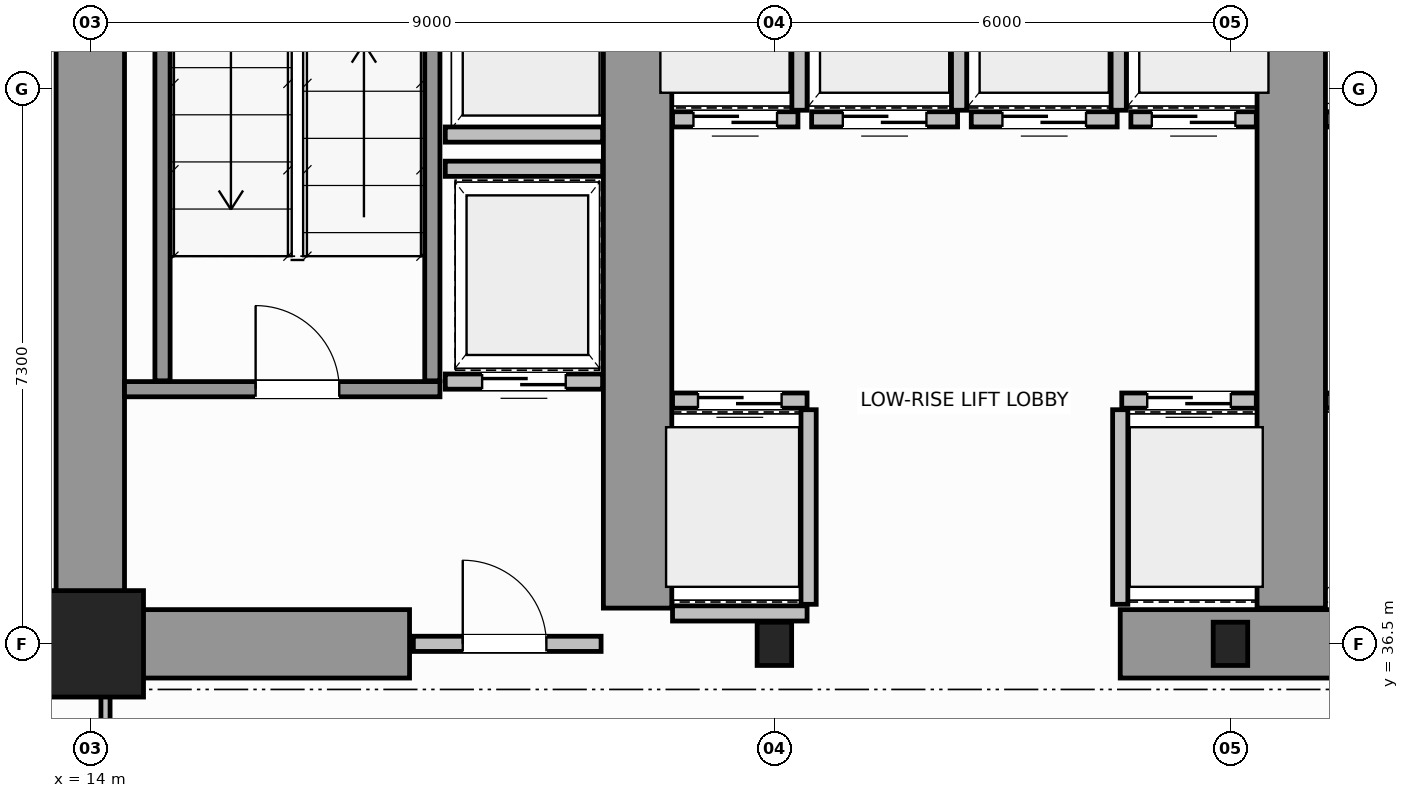
"""IFC4 building model, lengths in metres.
Left out: names, types, materials, properties, quantities, classifications, styles, units other than length and angle.
Written with IfcOpenShell. Run it as: python <this file> out.ifc"""

import sys

from ifc_helpers import new_model, si_unit, direction, frame, frame_2d, origin, origin_2d, place, context, subcontext, project, spatial, rectangle, i_section, extrude, source, transform, mapped, element, fill, save


model = new_model("IFC4")
c1 = context("Model", 3, precision=1e-05, world=origin(), true_north=direction((0.0, 1.0)))
c2 = subcontext(c1, "Body", "Model", "MODEL_VIEW")
j1 = project(units=[si_unit("LENGTHUNIT", "METRE"), si_unit("PLANEANGLEUNIT", "RADIAN")], contexts=[c1])
p1 = place(None, origin())
s1 = spatial("IfcSite", under=j1, at=p1, CompositionType="ELEMENT")
p2 = place(p1, origin())
s2 = spatial("IfcBuilding", under=s1, at=p2, CompositionType="ELEMENT")
p3 = place(p2, frame((0.0, 0.0, 64.4)))
s3 = spatial("IfcBuildingStorey", under=s2, at=p3, CompositionType="ELEMENT", Elevation=64.4)
m1 = source(origin(), c2, "Body", "SweptSolid", [
    extrude(rectangle(XDim=1.4, YDim=1.4, at=origin_2d()), origin(), (0.0, 0.0, 1.0), 3.8),
])
p4 = place(p3, frame((14.0, 36.5, 0.0), z_axis=(0.0, 0.0, 1.0), x_axis=(1.0, 0.0, 0.0)))
e1 = element("IfcColumn", 1, at=p4, inside=s3, PredefinedType="COLUMN", context=c2, shape_type="MappedRepresentation", body=[
    mapped(m1, transform((0.0, 0.0, 0.0), scale=1.0)),
])
m2 = source(origin(), c2, "Body", "SweptSolid", [
    extrude(i_section(OverallWidth=0.454, OverallDepth=0.569, WebThickness=0.078, FlangeThickness=0.08, FilletRadius=0.015, at=origin_2d()), origin(), (0.0, 0.0, 1.0), 3.8),
])
for number, where, z_axis, x_axis in (
    (2, (23.0, 36.5, 0.0), (0.0, 0.0, 1.0), (1.0, 0.0, 0.0)),
    (3, (29.0, 36.5, 0.0), (0.0, 0.0, 1.0), (1.0, 0.0, 0.0)),
):
    element("IfcColumn", number, at=place(p3, frame(where, z_axis=z_axis, x_axis=x_axis)), inside=s3, PredefinedType="COLUMN", context=c2, shape_type="MappedRepresentation", body=[
        mapped(m2, transform((0.0, 0.0, 0.0), scale=1.0)),
    ])
p5 = place(p3, frame((14.0, 36.5, 0.0), z_axis=(0.0, 0.0, 1.0), x_axis=(0.0, 1.0, 0.0)))
e4 = element("IfcWall", 4, at=p5, inside=s3, PredefinedType="SHEAR", context=c2, shape_type="SweptSolid", body=[
    extrude(rectangle(XDim=14.5, YDim=0.9, at=frame_2d((7.25, 0.0))), origin(), (0.0, 0.0, 1.0), 3.8),
])
p6 = place(p3, frame((14.47, 36.5, 0.0), z_axis=(0.0, 0.0, 1.0), x_axis=(1.0, 0.0, 0.0)))
e5 = element("IfcWall", 5, at=p6, inside=s3, PredefinedType="SHEAR", context=c2, shape_type="SweptSolid", body=[
    extrude(rectangle(XDim=3.73, YDim=0.9, at=frame_2d((1.865, 0.0))), origin(), (0.0, 0.0, 1.0), 2.38),
])
p7 = place(p3, frame((27.55, 36.5, 0.0), z_axis=(0.0, 0.0, 1.0), x_axis=(1.0, 0.0, 0.0)))
e6 = element("IfcWall", 6, at=p7, inside=s3, PredefinedType="SHEAR", context=c2, shape_type="SweptSolid", body=[
    extrude(rectangle(XDim=4.5, YDim=0.9, at=frame_2d((2.25, 0.0))), origin(), (0.0, 0.0, 1.0), 3.8),
])
for number, where, z_axis, x_axis in (
    (7, (21.2, 36.97, 0.0), (0.0, 0.0, 1.0), (0.0, 1.0, 0.0)),
    (8, (29.8, 36.97, 0.0), (0.0, 0.0, 1.0), (0.0, 1.0, 0.0)),
):
    element("IfcWall", number, at=place(p3, frame(where, z_axis=z_axis, x_axis=x_axis)), inside=s3, PredefinedType="SHEAR", context=c2, shape_type="SweptSolid", body=[
        extrude(rectangle(XDim=9.23, YDim=0.9, at=frame_2d((4.615, 0.0))), origin(), (0.0, 0.0, 1.0), 3.8),
    ])
p8 = place(p3, frame((14.45, 39.85, 0.0), z_axis=(0.0, 0.0, 1.0), x_axis=(1.0, 0.0, 0.0)))
e9 = element("IfcWall", 9, at=p8, inside=s3, PredefinedType="SOLIDWALL", context=c2, shape_type="SweptSolid", body=[
    extrude(rectangle(XDim=4.15, YDim=0.2, at=frame_2d((2.075, 0.0))), origin(), (0.0, 0.0, 1.0), 3.8),
])
p9 = place(p8, frame((1.725, 0.0, 0.0)))
e10 = element("IfcOpeningElement", 10, at=p9, cuts=e9, PredefinedType="OPENING", context=c2, shape_type="SweptSolid", body=[
    extrude(rectangle(XDim=1.1, YDim=2.15, at=frame_2d((0.55, 1.075))), frame((0.0, 0.11, 0.0), z_axis=(0.0, -1.0, 0.0), x_axis=(1.0, 0.0, 0.0)), (0.0, 0.0, 1.0), 0.22),
])
for number, where, z_axis, x_axis in (
    (11, (14.95, 39.96, 0.0), (0.0, 0.0, 1.0), (0.0, 1.0, 0.0)),
    (12, (18.5, 39.96, 0.0), (0.0, 0.0, 1.0), (0.0, 1.0, 0.0)),
):
    element("IfcWall", number, at=place(p3, frame(where, z_axis=z_axis, x_axis=x_axis)), inside=s3, PredefinedType="SOLIDWALL", context=c2, shape_type="SweptSolid", body=[
        extrude(rectangle(XDim=9.93, YDim=0.2, at=frame_2d((4.965, 0.0))), origin(), (0.0, 0.0, 1.0), 3.8),
    ])
p10 = place(p3, frame((18.25, 36.5, 0.0), z_axis=(0.0, 0.0, 1.0), x_axis=(1.0, 0.0, 0.0)))
e13 = element("IfcWall", 13, at=p10, inside=s3, PredefinedType="SOLIDWALL", context=c2, shape_type="SweptSolid", body=[
    extrude(rectangle(XDim=2.47, YDim=0.2, at=frame_2d((1.235, 0.0))), origin(), (0.0, 0.0, 1.0), 2.37),
])
p11 = place(p10, frame((0.65, 0.0, 0.0)))
e14 = element("IfcOpeningElement", 14, at=p11, cuts=e13, PredefinedType="OPENING", context=c2, shape_type="SweptSolid", body=[
    extrude(rectangle(XDim=1.1, YDim=2.15, at=frame_2d((0.55, 1.075))), frame((0.0, 0.11, 0.0), z_axis=(0.0, -1.0, 0.0), x_axis=(1.0, 0.0, 0.0)), (0.0, 0.0, 1.0), 0.22),
])
p12 = place(p3, frame((21.66, 39.7, 0.0), z_axis=(0.0, 0.0, 1.0), x_axis=(1.0, 0.0, 0.0)))
e15 = element("IfcWall", 15, at=p12, inside=s3, PredefinedType="SOLIDWALL", context=c2, shape_type="SweptSolid", body=[
    extrude(rectangle(XDim=1.77, YDim=0.2, at=frame_2d((0.885, 0.0))), origin(), (0.0, 0.0, 1.0), 3.58),
])
p13 = place(p12, frame((0.335, 0.0, 0.0)))
e16 = element("IfcOpeningElement", 16, at=p13, cuts=e15, PredefinedType="OPENING", context=c2, shape_type="SweptSolid", body=[
    extrude(rectangle(XDim=1.1, YDim=2.15, at=frame_2d((0.55, 1.075))), frame((0.0, 0.11, 0.0), z_axis=(0.0, -1.0, 0.0), x_axis=(1.0, 0.0, 0.0)), (0.0, 0.0, 1.0), 0.22),
])
p14 = place(p3, frame((21.66, 36.9, 0.0), z_axis=(0.0, 0.0, 1.0), x_axis=(1.0, 0.0, 0.0)))
e17 = element("IfcWall", 17, at=p14, inside=s3, PredefinedType="SOLIDWALL", context=c2, shape_type="SweptSolid", body=[
    extrude(rectangle(XDim=1.77, YDim=0.2, at=frame_2d((0.885, 0.0))), origin(), (0.0, 0.0, 1.0), 2.37),
])
p15 = place(p3, frame((23.45, 37.02, 0.0), z_axis=(0.0, 0.0, 1.0), x_axis=(0.0, 1.0, 0.0)))
e18 = element("IfcWall", 18, at=p15, inside=s3, PredefinedType="SOLIDWALL", context=c2, shape_type="SweptSolid", body=[
    extrude(rectangle(XDim=2.56, YDim=0.2, at=frame_2d((1.28, 0.0))), origin(), (0.0, 0.0, 1.0), 3.58),
])
p16 = place(p3, frame((27.57, 39.7, 0.0), z_axis=(0.0, 0.0, 1.0), x_axis=(1.0, 0.0, 0.0)))
e19 = element("IfcWall", 19, at=p16, inside=s3, PredefinedType="SOLIDWALL", context=c2, shape_type="SweptSolid", body=[
    extrude(rectangle(XDim=1.77, YDim=0.2, at=frame_2d((0.885, 0.0))), origin(), (0.0, 0.0, 1.0), 3.58),
])
p17 = place(p16, frame((0.335, 0.0, 0.0)))
e20 = element("IfcOpeningElement", 20, at=p17, cuts=e19, PredefinedType="OPENING", context=c2, shape_type="SweptSolid", body=[
    extrude(rectangle(XDim=1.1, YDim=2.15, at=frame_2d((0.55, 1.075))), frame((0.0, 0.11, 0.0), z_axis=(0.0, -1.0, 0.0), x_axis=(1.0, 0.0, 0.0)), (0.0, 0.0, 1.0), 0.22),
])
p18 = place(p3, frame((27.55, 37.02, 0.0), z_axis=(0.0, 0.0, 1.0), x_axis=(0.0, 1.0, 0.0)))
e21 = element("IfcWall", 21, at=p18, inside=s3, PredefinedType="SOLIDWALL", context=c2, shape_type="SweptSolid", body=[
    extrude(rectangle(XDim=2.56, YDim=0.2, at=frame_2d((1.28, 0.0))), origin(), (0.0, 0.0, 1.0), 3.58),
])
p19 = place(p3, frame((21.66, 43.4, 0.0), z_axis=(0.0, 0.0, 1.0), x_axis=(1.0, 0.0, 0.0)))
e22 = element("IfcWall", 22, at=p19, inside=s3, PredefinedType="SOLIDWALL", context=c2, shape_type="SweptSolid", body=[
    extrude(rectangle(XDim=1.65, YDim=0.2, at=frame_2d((0.825, 0.0))), origin(), (0.0, 0.0, 1.0), 3.58),
])
p20 = place(p19, frame((0.275, 0.0, 0.0)))
e23 = element("IfcOpeningElement", 23, at=p20, cuts=e22, PredefinedType="OPENING", context=c2, shape_type="SweptSolid", body=[
    extrude(rectangle(XDim=1.1, YDim=2.15, at=frame_2d((0.55, 1.075))), frame((0.0, 0.11, 0.0), z_axis=(0.0, -1.0, 0.0), x_axis=(1.0, 0.0, 0.0)), (0.0, 0.0, 1.0), 0.22),
])
p21 = place(p3, frame((23.33, 43.52, 0.0), z_axis=(0.0, 0.0, 1.0), x_axis=(0.0, 1.0, 0.0)))
e24 = element("IfcWall", 24, at=p21, inside=s3, PredefinedType="SOLIDWALL", context=c2, shape_type="SweptSolid", body=[
    extrude(rectangle(XDim=2.56, YDim=0.2, at=frame_2d((1.28, 0.0))), origin(), (0.0, 0.0, 1.0), 3.58),
])
p22 = place(p3, frame((23.49, 43.4, 0.0), z_axis=(0.0, 0.0, 1.0), x_axis=(1.0, 0.0, 0.0)))
e25 = element("IfcWall", 25, at=p22, inside=s3, PredefinedType="SOLIDWALL", context=c2, shape_type="SweptSolid", body=[
    extrude(rectangle(XDim=1.92, YDim=0.2, at=frame_2d((0.96, 0.0))), origin(), (0.0, 0.0, 1.0), 3.58),
])
p23 = place(p22, frame((0.41, 0.0, 0.0)))
e26 = element("IfcOpeningElement", 26, at=p23, cuts=e25, PredefinedType="OPENING", context=c2, shape_type="SweptSolid", body=[
    extrude(rectangle(XDim=1.1, YDim=2.15, at=frame_2d((0.55, 1.075))), frame((0.0, 0.11, 0.0), z_axis=(0.0, -1.0, 0.0), x_axis=(1.0, 0.0, 0.0)), (0.0, 0.0, 1.0), 0.22),
])
p24 = place(p3, frame((25.43, 43.52, 0.0), z_axis=(0.0, 0.0, 1.0), x_axis=(0.0, 1.0, 0.0)))
e27 = element("IfcWall", 27, at=p24, inside=s3, PredefinedType="SOLIDWALL", context=c2, shape_type="SweptSolid", body=[
    extrude(rectangle(XDim=2.56, YDim=0.2, at=frame_2d((1.28, 0.0))), origin(), (0.0, 0.0, 1.0), 3.58),
])
p25 = place(p3, frame((25.59, 43.4, 0.0), z_axis=(0.0, 0.0, 1.0), x_axis=(1.0, 0.0, 0.0)))
e28 = element("IfcWall", 28, at=p25, inside=s3, PredefinedType="SOLIDWALL", context=c2, shape_type="SweptSolid", body=[
    extrude(rectangle(XDim=1.92, YDim=0.2, at=frame_2d((0.96, 0.0))), origin(), (0.0, 0.0, 1.0), 3.58),
])
p26 = place(p25, frame((0.41, 0.0, 0.0)))
e29 = element("IfcOpeningElement", 29, at=p26, cuts=e28, PredefinedType="OPENING", context=c2, shape_type="SweptSolid", body=[
    extrude(rectangle(XDim=1.1, YDim=2.15, at=frame_2d((0.55, 1.075))), frame((0.0, 0.11, 0.0), z_axis=(0.0, -1.0, 0.0), x_axis=(1.0, 0.0, 0.0)), (0.0, 0.0, 1.0), 0.22),
])
p27 = place(p3, frame((27.53, 43.52, 0.0), z_axis=(0.0, 0.0, 1.0), x_axis=(0.0, 1.0, 0.0)))
e30 = element("IfcWall", 30, at=p27, inside=s3, PredefinedType="SOLIDWALL", context=c2, shape_type="SweptSolid", body=[
    extrude(rectangle(XDim=2.56, YDim=0.2, at=frame_2d((1.28, 0.0))), origin(), (0.0, 0.0, 1.0), 3.58),
])
p28 = place(p3, frame((27.69, 43.4, 0.0), z_axis=(0.0, 0.0, 1.0), x_axis=(1.0, 0.0, 0.0)))
e31 = element("IfcWall", 31, at=p28, inside=s3, PredefinedType="SOLIDWALL", context=c2, shape_type="SweptSolid", body=[
    extrude(rectangle(XDim=1.65, YDim=0.2, at=frame_2d((0.825, 0.0))), origin(), (0.0, 0.0, 1.0), 3.58),
])
p29 = place(p28, frame((0.275, 0.0, 0.0)))
e32 = element("IfcOpeningElement", 32, at=p29, cuts=e31, PredefinedType="OPENING", context=c2, shape_type="SweptSolid", body=[
    extrude(rectangle(XDim=1.1, YDim=2.15, at=frame_2d((0.55, 1.075))), frame((0.0, 0.11, 0.0), z_axis=(0.0, -1.0, 0.0), x_axis=(1.0, 0.0, 0.0)), (0.0, 0.0, 1.0), 0.22),
])
p30 = place(p3, frame((30.26, 39.7, 0.0), z_axis=(0.0, 0.0, 1.0), x_axis=(1.0, 0.0, 0.0)))
e33 = element("IfcWall", 33, at=p30, inside=s3, PredefinedType="SOLIDWALL", context=c2, shape_type="SweptSolid", body=[
    extrude(rectangle(XDim=1.77, YDim=0.2, at=frame_2d((0.885, 0.0))), origin(), (0.0, 0.0, 1.0), 3.58),
])
p31 = place(p3, frame((30.26, 43.4, 0.0), z_axis=(0.0, 0.0, 1.0), x_axis=(1.0, 0.0, 0.0)))
e34 = element("IfcWall", 34, at=p31, inside=s3, PredefinedType="SOLIDWALL", context=c2, shape_type="SweptSolid", body=[
    extrude(rectangle(XDim=1.65, YDim=0.2, at=frame_2d((0.825, 0.0))), origin(), (0.0, 0.0, 1.0), 3.58),
])
p32 = place(p3, frame((18.67, 43.2, 0.0), z_axis=(0.0, 0.0, 1.0), x_axis=(1.0, 0.0, 0.0)))
e35 = element("IfcWall", 35, at=p32, inside=s3, PredefinedType="SOLIDWALL", context=c2, shape_type="SweptSolid", body=[
    extrude(rectangle(XDim=2.07, YDim=0.2, at=frame_2d((1.035, 0.0))), origin(), (0.0, 0.0, 1.0), 3.58),
])
p33 = place(p3, frame((18.67, 39.95, 0.0), z_axis=(0.0, 0.0, 1.0), x_axis=(1.0, 0.0, 0.0)))
e36 = element("IfcWall", 36, at=p33, inside=s3, PredefinedType="SOLIDWALL", context=c2, shape_type="SweptSolid", body=[
    extrude(rectangle(XDim=2.07, YDim=0.2, at=frame_2d((1.035, 0.0))), origin(), (0.0, 0.0, 1.0), 3.58),
])
p34 = place(p33, frame((0.485, 0.0, 0.0)))
e37 = element("IfcOpeningElement", 37, at=p34, cuts=e36, PredefinedType="OPENING", context=c2, shape_type="SweptSolid", body=[
    extrude(rectangle(XDim=1.1, YDim=2.15, at=frame_2d((0.55, 1.075))), frame((0.0, 0.11, 0.0), z_axis=(0.0, -1.0, 0.0), x_axis=(1.0, 0.0, 0.0)), (0.0, 0.0, 1.0), 0.22),
])
p35 = place(p3, frame((18.67, 42.75, 0.0), z_axis=(0.0, 0.0, 1.0), x_axis=(1.0, 0.0, 0.0)))
e38 = element("IfcWall", 38, at=p35, inside=s3, PredefinedType="SOLIDWALL", context=c2, shape_type="SweptSolid", body=[
    extrude(rectangle(XDim=2.07, YDim=0.2, at=frame_2d((1.035, 0.0))), origin(), (0.0, 0.0, 1.0), 3.58),
])
p36 = place(p3, frame((14.2, 34.16, 0.0), z_axis=(0.0, 0.0, 1.0), x_axis=(0.0, 1.0, 0.0)))
e39 = element("IfcWall", 39, at=p36, inside=s3, PredefinedType="PARTITIONING", context=c2, shape_type="SweptSolid", body=[
    extrude(rectangle(XDim=2.28, YDim=0.12, at=frame_2d((1.14, 0.0))), origin(), (0.0, 0.0, 1.0), 3.58),
])
p37 = place(p36, frame((0.3, 0.0, 0.0)))
e40 = element("IfcOpeningElement", 40, at=p37, cuts=e39, PredefinedType="OPENING", context=c2, shape_type="SweptSolid", body=[
    extrude(rectangle(XDim=0.9, YDim=2.15, at=frame_2d((0.45, 1.075))), frame((0.0, 0.07, 0.0), z_axis=(0.0, -1.0, 0.0), x_axis=(1.0, 0.0, 0.0)), (0.0, 0.0, 1.0), 0.14),
])
m3 = source(origin(), c2, "Body", "SweptSolid", [
    extrude(rectangle(XDim=1.1, YDim=2.15, at=frame_2d((0.55, 1.075))), frame((0.0, 0.025, 0.0), z_axis=(0.0, -1.0, 0.0), x_axis=(1.0, 0.0, 0.0)), (0.0, 0.0, 1.0), 0.05),
])
p38 = place(p9, origin())
e41 = element("IfcDoor", 41, at=p38, inside=s3, OperationType="SINGLE_SWING_LEFT", PredefinedType="DOOR", context=c2, shape_type="MappedRepresentation", body=[
    mapped(m3, transform((0.0, 0.0, 0.0), scale=1.0)),
])
fill(e10, e41)
p39 = place(p11, origin())
e42 = element("IfcDoor", 42, at=p39, inside=s3, OperationType="SINGLE_SWING_RIGHT", PredefinedType="DOOR", context=c2, shape_type="MappedRepresentation", body=[
    mapped(m3, transform((0.0, 0.0, 0.0), scale=1.0)),
])
fill(e14, e42)
p40 = place(p13, origin())
e43 = element("IfcDoor", 43, at=p40, inside=s3, OperationType="DOUBLE_DOOR_SLIDING", PredefinedType="DOOR", context=c2, shape_type="MappedRepresentation", body=[
    mapped(m3, transform((0.0, 0.0, 0.0), scale=1.0)),
])
fill(e16, e43)
p41 = place(p17, origin())
e44 = element("IfcDoor", 44, at=p41, inside=s3, OperationType="DOUBLE_DOOR_SLIDING", PredefinedType="DOOR", context=c2, shape_type="MappedRepresentation", body=[
    mapped(m3, transform((0.0, 0.0, 0.0), scale=1.0)),
])
fill(e20, e44)
p42 = place(p20, origin())
e45 = element("IfcDoor", 45, at=p42, inside=s3, OperationType="DOUBLE_DOOR_SLIDING", PredefinedType="DOOR", context=c2, shape_type="MappedRepresentation", body=[
    mapped(m3, transform((0.0, 0.0, 0.0), scale=1.0)),
])
fill(e23, e45)
p43 = place(p23, origin())
e46 = element("IfcDoor", 46, at=p43, inside=s3, OperationType="DOUBLE_DOOR_SLIDING", PredefinedType="DOOR", context=c2, shape_type="MappedRepresentation", body=[
    mapped(m3, transform((0.0, 0.0, 0.0), scale=1.0)),
])
fill(e26, e46)
p44 = place(p26, origin())
e47 = element("IfcDoor", 47, at=p44, inside=s3, OperationType="DOUBLE_DOOR_SLIDING", PredefinedType="DOOR", context=c2, shape_type="MappedRepresentation", body=[
    mapped(m3, transform((0.0, 0.0, 0.0), scale=1.0)),
])
fill(e29, e47)
p45 = place(p29, origin())
e48 = element("IfcDoor", 48, at=p45, inside=s3, OperationType="DOUBLE_DOOR_SLIDING", PredefinedType="DOOR", context=c2, shape_type="MappedRepresentation", body=[
    mapped(m3, transform((0.0, 0.0, 0.0), scale=1.0)),
])
fill(e32, e48)
p46 = place(p34, origin())
e49 = element("IfcDoor", 49, at=p46, inside=s3, OperationType="DOUBLE_DOOR_SLIDING", PredefinedType="DOOR", context=c2, shape_type="MappedRepresentation", body=[
    mapped(m3, transform((0.0, 0.0, 0.0), scale=1.0)),
])
fill(e37, e49)
save(model, sys.argv[1])
